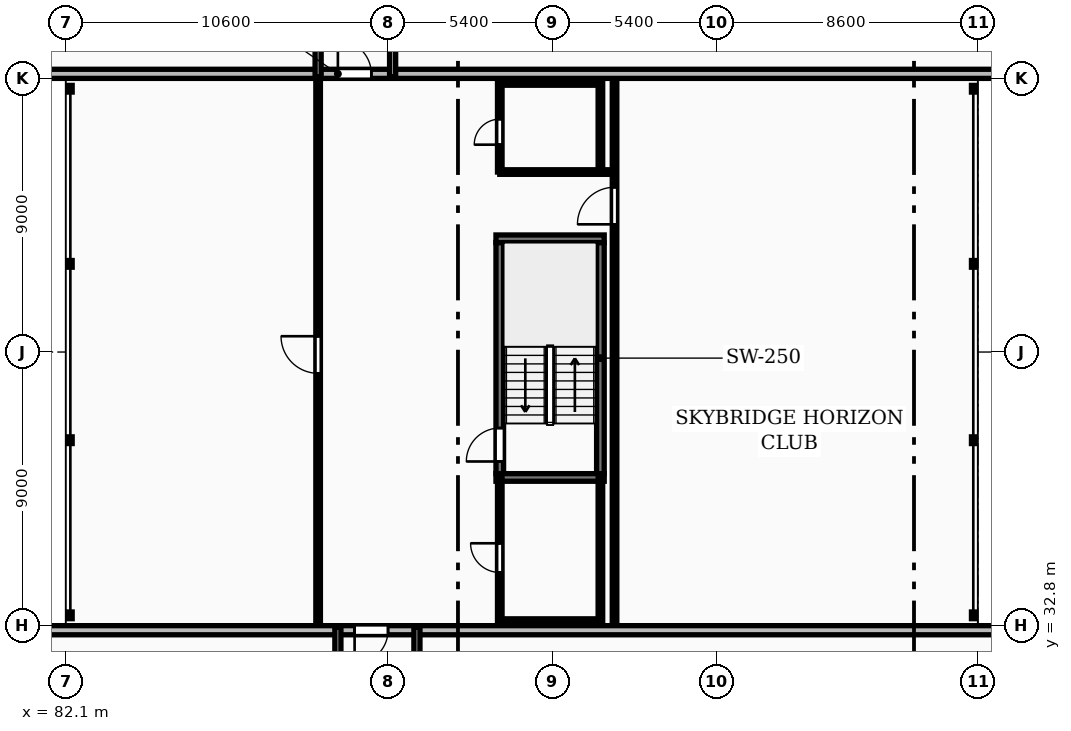
"""IFC4 building model, lengths in metres.
Left out: names, types, materials, properties, quantities, classifications, styles, units other than length and angle.
Written with IfcOpenShell. Run it as: python <this file> out.ifc"""

import sys

from ifc_helpers import new_model, si_unit, direction, frame, frame_2d, origin, place, context, subcontext, project, spatial, rectangle, extrude, element, fill, save


model = new_model("IFC4")
c1 = context("Model", 3, precision=1e-05, world=origin(), true_north=direction((0.0, 1.0)))
c2 = subcontext(c1, "Body", "Model", "MODEL_VIEW")
j1 = project(units=[si_unit("LENGTHUNIT", "METRE"), si_unit("PLANEANGLEUNIT", "RADIAN")], contexts=[c1])
p1 = place(None, origin())
s1 = spatial("IfcSite", under=j1, at=p1, CompositionType="ELEMENT")
p2 = place(p1, origin())
s2 = spatial("IfcBuilding", under=s1, at=p2, CompositionType="ELEMENT")
p3 = place(p2, frame((0.0, 0.0, 146.5)))
s3 = spatial("IfcBuildingStorey", under=s2, at=p3, CompositionType="ELEMENT", Elevation=146.5)
p4 = place(p3, frame((57.6, 50.95, 0.0), z_axis=(0.0, 0.0, 1.0), x_axis=(1.0, 0.0, 0.0)))
e1 = element("IfcWall", 1, at=p4, inside=s3, PredefinedType="STANDARD", context=c2, shape_type="SweptSolid", body=[
    extrude(rectangle(XDim=73.0, YDim=0.3, at=frame_2d((36.5, 0.0))), origin(), (0.0, 0.0, 1.0), 3.31),
])
p5 = place(p4, frame((15.225, 0.0, 0.85)))
e2 = element("IfcOpeningElement", 2, at=p5, cuts=e1, PredefinedType="OPENING", context=c2, shape_type="SweptSolid", body=[
    extrude(rectangle(XDim=1.8, YDim=1.8, at=frame_2d((0.9, 0.9))), frame((0.0, 0.16, 0.0), z_axis=(0.0, -1.0, 0.0), x_axis=(1.0, 0.0, 0.0)), (0.0, 0.0, 1.0), 0.32),
])
p6 = place(p4, frame((58.575, 0.0, 0.85)))
e3 = element("IfcOpeningElement", 3, at=p6, cuts=e1, PredefinedType="OPENING", context=c2, shape_type="SweptSolid", body=[
    extrude(rectangle(XDim=1.8, YDim=1.8, at=frame_2d((0.9, 0.9))), frame((0.0, 0.16, 0.0), z_axis=(0.0, -1.0, 0.0), x_axis=(1.0, 0.0, 0.0)), (0.0, 0.0, 1.0), 0.32),
])
p7 = place(p4, frame((33.45, 0.0, 0.0)))
e4 = element("IfcOpeningElement", 4, at=p7, cuts=e1, PredefinedType="OPENING", context=c2, shape_type="SweptSolid", body=[
    extrude(rectangle(XDim=1.1, YDim=2.1, at=frame_2d((0.55, 1.05))), frame((0.0, 0.16, 0.0), z_axis=(0.0, -1.0, 0.0), x_axis=(1.0, 0.0, 0.0)), (0.0, 0.0, 1.0), 0.32),
])
p8 = place(p3, frame((130.7, 32.65, 0.0), z_axis=(0.0, 0.0, 1.0), x_axis=(-1.0, 0.0, 0.0)))
e5 = element("IfcWall", 5, at=p8, inside=s3, PredefinedType="STANDARD", context=c2, shape_type="SweptSolid", body=[
    extrude(rectangle(XDim=58.0, YDim=0.3, at=frame_2d((29.0, 0.0))), origin(), (0.0, 0.0, 1.0), 3.31),
])
p9 = place(p8, frame((50.125, 0.0, 0.85)))
e6 = element("IfcOpeningElement", 6, at=p9, cuts=e5, PredefinedType="OPENING", context=c2, shape_type="SweptSolid", body=[
    extrude(rectangle(XDim=1.8, YDim=1.8, at=frame_2d((0.9, 0.9))), frame((0.0, 0.16, 0.0), z_axis=(0.0, -1.0, 0.0), x_axis=(1.0, 0.0, 0.0)), (0.0, 0.0, 1.0), 0.32),
])
p10 = place(p8, frame((6.775, 0.0, 0.85)))
e7 = element("IfcOpeningElement", 7, at=p10, cuts=e5, PredefinedType="OPENING", context=c2, shape_type="SweptSolid", body=[
    extrude(rectangle(XDim=1.8, YDim=1.8, at=frame_2d((0.9, 0.9))), frame((0.0, 0.16, 0.0), z_axis=(0.0, -1.0, 0.0), x_axis=(1.0, 0.0, 0.0)), (0.0, 0.0, 1.0), 0.32),
])
p11 = place(p8, frame((38.0, 0.0, 0.0)))
e8 = element("IfcOpeningElement", 8, at=p11, cuts=e5, PredefinedType="OPENING", context=c2, shape_type="SweptSolid", body=[
    extrude(rectangle(XDim=1.1, YDim=2.1, at=frame_2d((0.55, 1.05))), frame((0.0, 0.16, 0.0), z_axis=(0.0, -1.0, 0.0), x_axis=(1.0, 0.0, 0.0)), (0.0, 0.0, 1.0), 0.32),
])
for number, where, z_axis, x_axis in (
    (9, (90.4, 50.85, 0.0), (0.0, 0.0, 1.0), (0.0, 1.0, 0.0)),
    (10, (92.85, 50.85, 0.0), (0.0, 0.0, 1.0), (0.0, 1.0, 0.0)),
):
    element("IfcWall", number, at=place(p3, frame(where, z_axis=z_axis, x_axis=x_axis)), inside=s3, PredefinedType="PARTITIONING", context=c2, shape_type="SweptSolid", body=[
        extrude(rectangle(XDim=4.2, YDim=0.2, at=frame_2d((2.1, 0.0))), origin(), (0.0, 0.0, 1.0), 3.31),
    ])
p12 = place(p3, frame((91.05, 30.55, 0.0), z_axis=(0.0, 0.0, 1.0), x_axis=(0.0, 1.0, 0.0)))
e11 = element("IfcWall", 11, at=p12, inside=s3, PredefinedType="PARTITIONING", context=c2, shape_type="SweptSolid", body=[
    extrude(rectangle(XDim=2.2, YDim=0.2, at=frame_2d((1.1, 0.0))), origin(), (0.0, 0.0, 1.0), 3.31),
])
p13 = place(p3, frame((93.65, 30.55, 0.0), z_axis=(0.0, 0.0, 1.0), x_axis=(0.0, 1.0, 0.0)))
e12 = element("IfcWall", 12, at=p13, inside=s3, PredefinedType="PARTITIONING", context=c2, shape_type="SweptSolid", body=[
    extrude(rectangle(XDim=2.2, YDim=0.2, at=frame_2d((1.1, 0.0))), origin(), (0.0, 0.0, 1.0), 2.383),
])
p14 = place(p3, frame((96.375, 37.8, 0.0), z_axis=(0.0, 0.0, 1.0), x_axis=(0.0, 1.0, 0.0)))
e13 = element("IfcWall", 13, at=p14, inside=s3, PredefinedType="SHEAR", context=c2, shape_type="SweptSolid", body=[
    extrude(rectangle(XDim=7.6, YDim=0.25, at=frame_2d((3.8, 0.0))), origin(), (0.0, 0.0, 1.0), 3.6),
])
p15 = place(p14, frame((0.4, 0.0, 0.0)))
e14 = element("IfcOpeningElement", 14, at=p15, cuts=e13, PredefinedType="OPENING", context=c2, shape_type="SweptSolid", body=[
    extrude(rectangle(XDim=1.1, YDim=2.1, at=frame_2d((0.55, 1.05))), frame((0.0, 0.135, 0.0), z_axis=(0.0, -1.0, 0.0), x_axis=(1.0, 0.0, 0.0)), (0.0, 0.0, 1.0), 0.27),
])
p16 = place(p3, frame((99.685, 37.8, 0.0), z_axis=(0.0, 0.0, 1.0), x_axis=(0.0, 1.0, 0.0)))
e15 = element("IfcWall", 15, at=p16, inside=s3, PredefinedType="SHEAR", context=c2, shape_type="SweptSolid", body=[
    extrude(rectangle(XDim=7.6, YDim=0.25, at=frame_2d((3.8, 0.0))), origin(), (0.0, 0.0, 1.0), 3.6),
])
for number, where, z_axis, x_axis in (
    (16, (96.25, 37.675, 0.0), (0.0, 0.0, 1.0), (1.0, 0.0, 0.0)),
    (17, (96.25, 45.525, 0.0), (0.0, 0.0, 1.0), (1.0, 0.0, 0.0)),
):
    element("IfcWall", number, at=place(p3, frame(where, z_axis=z_axis, x_axis=x_axis)), inside=s3, PredefinedType="SHEAR", context=c2, shape_type="SweptSolid", body=[
        extrude(rectangle(XDim=3.56, YDim=0.25, at=frame_2d((1.78, 0.0))), origin(), (0.0, 0.0, 1.0), 3.6),
    ])
for number, where, z_axis, x_axis in (
    (18, (96.375, 32.95, 0.0), (0.0, 0.0, 1.0), (1.0, 0.0, 0.0)),
    (19, (96.375, 50.65, 0.0), (0.0, 0.0, 1.0), (1.0, 0.0, 0.0)),
):
    element("IfcWall", number, at=place(p3, frame(where, z_axis=z_axis, x_axis=x_axis)), inside=s3, PredefinedType="PARTITIONING", context=c2, shape_type="SweptSolid", body=[
        extrude(rectangle(XDim=3.31, YDim=0.15, at=frame_2d((1.655, 0.0))), origin(), (0.0, 0.0, 1.0), 2.69),
    ])
p17 = place(p3, frame((96.375, 32.95, 0.0), z_axis=(0.0, 0.0, 1.0), x_axis=(0.0, 1.0, 0.0)))
e20 = element("IfcWall", 20, at=p17, inside=s3, PredefinedType="PARTITIONING", context=c2, shape_type="SweptSolid", body=[
    extrude(rectangle(XDim=4.725, YDim=0.15, at=frame_2d((2.363, 0.0))), origin(), (0.0, 0.0, 1.0), 2.383),
])
p18 = place(p17, frame((1.6, 0.0, 0.0)))
e21 = element("IfcOpeningElement", 21, at=p18, cuts=e20, PredefinedType="OPENING", context=c2, shape_type="SweptSolid", body=[
    extrude(rectangle(XDim=0.96, YDim=2.1, at=frame_2d((0.48, 1.05))), frame((0.0, 0.085, 0.0), z_axis=(0.0, -1.0, 0.0), x_axis=(1.0, 0.0, 0.0)), (0.0, 0.0, 1.0), 0.17),
])
p19 = place(p3, frame((96.375, 47.72, 0.0), z_axis=(0.0, 0.0, 1.0), x_axis=(0.0, 1.0, 0.0)))
e22 = element("IfcWall", 22, at=p19, inside=s3, PredefinedType="PARTITIONING", context=c2, shape_type="SweptSolid", body=[
    extrude(rectangle(XDim=2.93, YDim=0.15, at=frame_2d((1.465, 0.0))), origin(), (0.0, 0.0, 1.0), 2.383),
])
p20 = place(p19, frame((0.9, 0.0, 0.0)))
e23 = element("IfcOpeningElement", 23, at=p20, cuts=e22, PredefinedType="OPENING", context=c2, shape_type="SweptSolid", body=[
    extrude(rectangle(XDim=0.84, YDim=2.04, at=frame_2d((0.42, 1.02))), frame((0.0, 0.085, 0.0), z_axis=(0.0, -1.0, 0.0), x_axis=(1.0, 0.0, 0.0)), (0.0, 0.0, 1.0), 0.17),
])
p21 = place(p3, frame((96.375, 47.72, 0.0), z_axis=(0.0, 0.0, 1.0), x_axis=(1.0, 0.0, 0.0)))
e24 = element("IfcWall", 24, at=p21, inside=s3, PredefinedType="PARTITIONING", context=c2, shape_type="SweptSolid", body=[
    extrude(rectangle(XDim=3.775, YDim=0.15, at=frame_2d((1.887, 0.0))), origin(), (0.0, 0.0, 1.0), 3.31),
])
p22 = place(p3, frame((99.685, 32.95, 0.0), z_axis=(0.0, 0.0, 1.0), x_axis=(0.0, 1.0, 0.0)))
e25 = element("IfcWall", 25, at=p22, inside=s3, PredefinedType="PARTITIONING", context=c2, shape_type="SweptSolid", body=[
    extrude(rectangle(XDim=4.725, YDim=0.15, at=frame_2d((2.363, 0.0))), origin(), (0.0, 0.0, 1.0), 2.383),
])
p23 = place(p3, frame((99.685, 47.72, 0.0), z_axis=(0.0, 0.0, 1.0), x_axis=(0.0, 1.0, 0.0)))
e26 = element("IfcWall", 26, at=p23, inside=s3, PredefinedType="PARTITIONING", context=c2, shape_type="SweptSolid", body=[
    extrude(rectangle(XDim=2.93, YDim=0.15, at=frame_2d((1.465, 0.0))), origin(), (0.0, 0.0, 1.0), 2.383),
])
p24 = place(p3, frame((90.4, 32.9, 0.0), z_axis=(0.0, 0.0, 1.0), x_axis=(0.0, 1.0, 0.0)))
e27 = element("IfcWall", 27, at=p24, inside=s3, PredefinedType="PARTITIONING", context=c2, shape_type="SweptSolid", body=[
    extrude(rectangle(XDim=17.8, YDim=0.15, at=frame_2d((8.9, 0.0))), origin(), (0.0, 0.0, 1.0), 3.31),
])
p25 = place(p24, frame((8.2, 0.0, 0.0)))
e28 = element("IfcOpeningElement", 28, at=p25, cuts=e27, PredefinedType="OPENING", context=c2, shape_type="SweptSolid", body=[
    extrude(rectangle(XDim=1.22, YDim=2.18, at=frame_2d((0.61, 1.09))), frame((0.0, 0.085, 0.0), z_axis=(0.0, -1.0, 0.0), x_axis=(1.0, 0.0, 0.0)), (0.0, 0.0, 1.0), 0.17),
])
p26 = place(p3, frame((100.15, 32.9, 0.0), z_axis=(0.0, 0.0, 1.0), x_axis=(0.0, 1.0, 0.0)))
e29 = element("IfcWall", 29, at=p26, inside=s3, PredefinedType="PARTITIONING", context=c2, shape_type="SweptSolid", body=[
    extrude(rectangle(XDim=17.8, YDim=0.15, at=frame_2d((8.9, 0.0))), origin(), (0.0, 0.0, 1.0), 3.31),
])
p27 = place(p26, frame((13.1, 0.0, 0.0)))
e30 = element("IfcOpeningElement", 30, at=p27, cuts=e29, PredefinedType="OPENING", context=c2, shape_type="SweptSolid", body=[
    extrude(rectangle(XDim=1.22, YDim=2.18, at=frame_2d((0.61, 1.09))), frame((0.0, 0.085, 0.0), z_axis=(0.0, -1.0, 0.0), x_axis=(1.0, 0.0, 0.0)), (0.0, 0.0, 1.0), 0.17),
])
p28 = place(p7, origin())
e31 = element("IfcDoor", 31, at=p28, inside=s3, OperationType="SINGLE_SWING_LEFT", PredefinedType="DOOR", context=c2, shape_type="SweptSolid", body=[
    extrude(rectangle(XDim=1.1, YDim=2.1, at=frame_2d((0.55, 1.05))), frame((0.0, 0.025, 0.0), z_axis=(0.0, -1.0, 0.0), x_axis=(1.0, 0.0, 0.0)), (0.0, 0.0, 1.0), 0.05),
])
fill(e4, e31)
p29 = place(p11, origin())
e32 = element("IfcDoor", 32, at=p29, inside=s3, OperationType="SINGLE_SWING_RIGHT", PredefinedType="DOOR", context=c2, shape_type="SweptSolid", body=[
    extrude(rectangle(XDim=1.1, YDim=2.1, at=frame_2d((0.55, 1.05))), frame((0.0, 0.025, 0.0), z_axis=(0.0, -1.0, 0.0), x_axis=(1.0, 0.0, 0.0)), (0.0, 0.0, 1.0), 0.05),
])
fill(e8, e32)
p30 = place(p15, origin())
e33 = element("IfcDoor", 33, at=p30, inside=s3, OperationType="SINGLE_SWING_LEFT", PredefinedType="DOOR", context=c2, shape_type="SweptSolid", body=[
    extrude(rectangle(XDim=1.1, YDim=2.1, at=frame_2d((0.55, 1.05))), frame((0.0, 0.025, 0.0), z_axis=(0.0, -1.0, 0.0), x_axis=(1.0, 0.0, 0.0)), (0.0, 0.0, 1.0), 0.05),
])
fill(e14, e33)
p31 = place(p18, origin())
e34 = element("IfcDoor", 34, at=p31, inside=s3, OperationType="SINGLE_SWING_RIGHT", PredefinedType="DOOR", context=c2, shape_type="SweptSolid", body=[
    extrude(rectangle(XDim=0.96, YDim=2.1, at=frame_2d((0.48, 1.05))), frame((0.0, 0.025, 0.0), z_axis=(0.0, -1.0, 0.0), x_axis=(1.0, 0.0, 0.0)), (0.0, 0.0, 1.0), 0.05),
])
fill(e21, e34)
p32 = place(p20, origin())
e35 = element("IfcDoor", 35, at=p32, inside=s3, OperationType="SINGLE_SWING_LEFT", PredefinedType="DOOR", context=c2, shape_type="SweptSolid", body=[
    extrude(rectangle(XDim=0.84, YDim=2.04, at=frame_2d((0.42, 1.02))), frame((0.0, 0.025, 0.0), z_axis=(0.0, -1.0, 0.0), x_axis=(1.0, 0.0, 0.0)), (0.0, 0.0, 1.0), 0.05),
])
fill(e23, e35)
p33 = place(p25, origin())
e36 = element("IfcDoor", 36, at=p33, inside=s3, OperationType="SINGLE_SWING_RIGHT", PredefinedType="DOOR", context=c2, shape_type="SweptSolid", body=[
    extrude(rectangle(XDim=1.22, YDim=2.18, at=frame_2d((0.61, 1.09))), frame((0.0, 0.025, 0.0), z_axis=(0.0, -1.0, 0.0), x_axis=(1.0, 0.0, 0.0)), (0.0, 0.0, 1.0), 0.05),
])
fill(e28, e36)
p34 = place(p27, origin())
e37 = element("IfcDoor", 37, at=p34, inside=s3, OperationType="SINGLE_SWING_LEFT", PredefinedType="DOOR", context=c2, shape_type="SweptSolid", body=[
    extrude(rectangle(XDim=1.22, YDim=2.18, at=frame_2d((0.61, 1.09))), frame((0.0, 0.025, 0.0), z_axis=(0.0, -1.0, 0.0), x_axis=(1.0, 0.0, 0.0)), (0.0, 0.0, 1.0), 0.05),
])
fill(e30, e37)
save(model, sys.argv[1])
